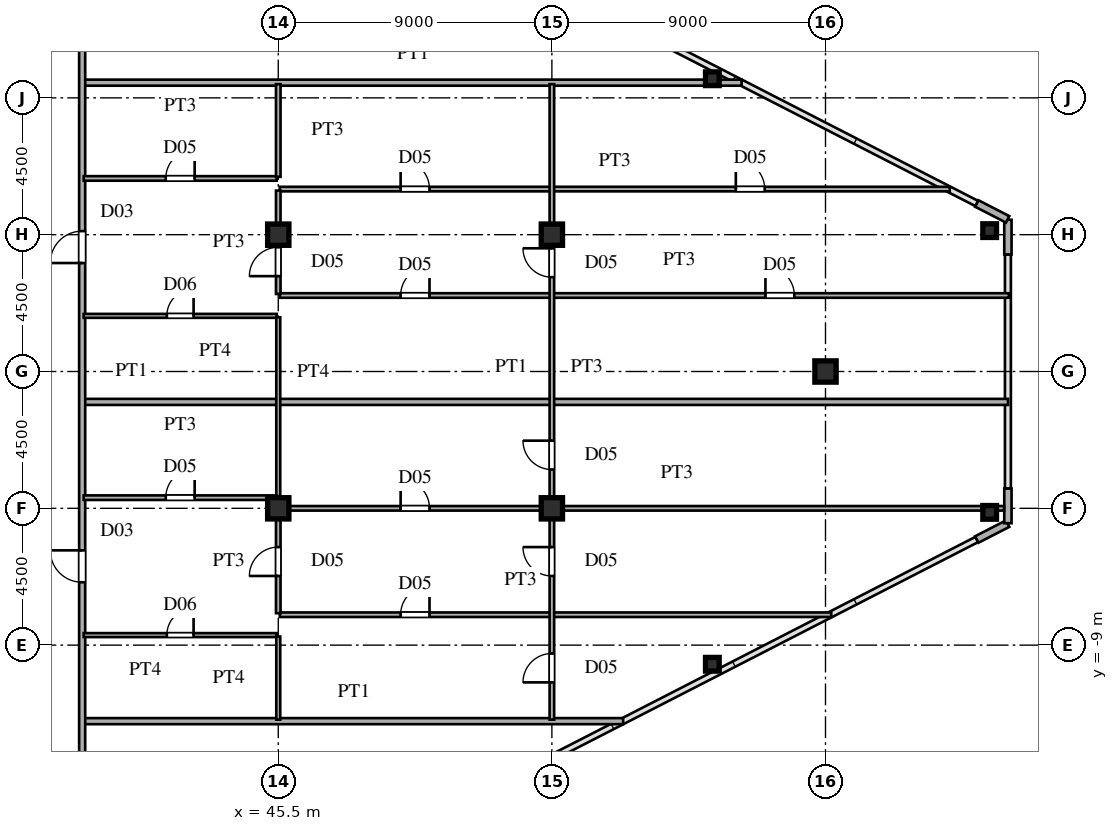
"""IFC4 building model, lengths in metres.
Left out: names, types, materials, properties, quantities, classifications, styles, units other than length and angle.
Written with IfcOpenShell. Run it as: python <this file> out.ifc"""

import sys

from ifc_helpers import new_model, si_unit, direction, frame, frame_2d, origin, origin_2d, place, context, subcontext, project, spatial, rectangle, hollow_rectangle, i_section, extrude, source, transform, mapped, element, fill, save


model = new_model("IFC4")
c1 = context("Model", 3, precision=1e-05, world=origin(), true_north=direction((0.0, 1.0)))
c2 = subcontext(c1, "Body", "Model", "MODEL_VIEW")
j1 = project(units=[si_unit("LENGTHUNIT", "METRE"), si_unit("PLANEANGLEUNIT", "RADIAN")], contexts=[c1])
p1 = place(None, origin())
s1 = spatial("IfcSite", under=j1, at=p1, CompositionType="ELEMENT")
p2 = place(p1, origin())
s2 = spatial("IfcBuilding", under=s1, at=p2, CompositionType="ELEMENT")
p3 = place(p2, frame((0.0, 0.0, 144.0)))
s3 = spatial("IfcBuildingStorey", under=s2, at=p3, CompositionType="ELEMENT", Elevation=144.0)
m1 = source(origin(), c2, "Body", "SweptSolid", [
    extrude(i_section(OverallWidth=0.7, OverallDepth=0.7, WebThickness=0.028, FlangeThickness=0.045, at=origin_2d()), origin(), (0.0, 0.0, 1.0), 3.6),
])
for number, where, z_axis, x_axis in (
    (1, (45.5, -4.5, 0.0), (0.0, 0.0, 1.0), (1.0, 0.0, 0.0)),
    (2, (45.5, 4.5, 0.0), (0.0, 0.0, 1.0), (1.0, 0.0, 0.0)),
    (3, (54.5, -4.5, 0.0), (0.0, 0.0, 1.0), (1.0, 0.0, 0.0)),
    (4, (54.5, 4.5, 0.0), (0.0, 0.0, 1.0), (1.0, 0.0, 0.0)),
    (5, (63.5, 0.0, 0.0), (0.0, 0.0, 1.0), (1.0, 0.0, 0.0)),
):
    element("IfcColumn", number, at=place(p3, frame(where, z_axis=z_axis, x_axis=x_axis)), inside=s3, PredefinedType="COLUMN", context=c2, shape_type="MappedRepresentation", body=[
        mapped(m1, transform((0.0, 0.0, 0.0), scale=1.0)),
    ])
m2 = source(origin(), c2, "Body", "SweptSolid", [
    extrude(hollow_rectangle(XDim=0.45, YDim=0.45, WallThickness=0.018, at=origin_2d()), origin(), (0.0, 0.0, 1.0), 3.6),
])
for number, where, z_axis, x_axis in (
    (6, (68.9, -4.634, 0.0), (0.0, 0.0, 1.0), (1.0, 0.0, 0.0)),
    (7, (68.9, 4.634, 0.0), (0.0, 0.0, 1.0), (1.0, 0.0, 0.0)),
    (8, (59.779, -9.629, 0.0), (0.0, 0.0, 1.0), (1.0, 0.0, 0.0)),
    (9, (59.779, 9.629, 0.0), (0.0, 0.0, 1.0), (1.0, 0.0, 0.0)),
):
    element("IfcColumn", number, at=place(p3, frame(where, z_axis=z_axis, x_axis=x_axis)), inside=s3, PredefinedType="COLUMN", context=c2, shape_type="MappedRepresentation", body=[
        mapped(m2, transform((0.0, 0.0, 0.0), scale=1.0)),
    ])
p4 = place(p3, frame((68.477, -5.525, 0.0), z_axis=(0.0, 0.0, 1.0), x_axis=(0.889797395748, 0.456355776255, 0.0)))
e10 = element("IfcWall", 10, at=p4, inside=s3, PredefinedType="SOLIDWALL", context=c2, shape_type="SweptSolid", body=[
    extrude(rectangle(XDim=1.14, YDim=0.24, at=frame_2d((0.57, 0.0))), origin(), (0.0, 0.0, 1.0), 3.38),
])
for number, where, z_axis, x_axis in (
    (11, (69.5, -4.99, 0.0), (0.0, 0.0, 1.0), (0.0, 1.0, 0.0)),
    (12, (69.5, 3.85, 0.0), (0.0, 0.0, 1.0), (0.0, 1.0, 0.0)),
):
    element("IfcWall", number, at=place(p3, frame(where, z_axis=z_axis, x_axis=x_axis)), inside=s3, PredefinedType="SOLIDWALL", context=c2, shape_type="SweptSolid", body=[
        extrude(rectangle(XDim=1.14, YDim=0.24, at=frame_2d((0.57, 0.0))), origin(), (0.0, 0.0, 1.0), 3.38),
    ])
p5 = place(p3, frame((69.491, 5.005, 0.0), z_axis=(0.0, 0.0, 1.0), x_axis=(-0.889797395748, 0.456355776255, 0.0)))
e13 = element("IfcWall", 13, at=p5, inside=s3, PredefinedType="SOLIDWALL", context=c2, shape_type="SweptSolid", body=[
    extrude(rectangle(XDim=1.14, YDim=0.24, at=frame_2d((0.57, 0.0))), origin(), (0.0, 0.0, 1.0), 3.38),
])
p6 = place(p3, frame((39.13, -11.5, 0.0), z_axis=(0.0, 0.0, 1.0), x_axis=(1.0, 0.0, 0.0)))
e14 = element("IfcWall", 14, at=p6, inside=s3, PredefinedType="PARTITIONING", context=c2, shape_type="SweptSolid", body=[
    extrude(rectangle(XDim=17.714, YDim=0.2, at=frame_2d((8.857, 0.0))), origin(), (0.0, 0.0, 1.0), 3.38),
])
p7 = place(p3, frame((39.1, -8.67, 0.0), z_axis=(0.0, 0.0, 1.0), x_axis=(1.0, 0.0, 0.0)))
e15 = element("IfcWall", 15, at=p7, inside=s3, PredefinedType="PARTITIONING", context=c2, shape_type="SweptSolid", body=[
    extrude(rectangle(XDim=6.35, YDim=0.13, at=frame_2d((3.175, 0.0))), origin(), (0.0, 0.0, 1.0), 3.38),
])
p8 = place(p7, frame((2.735, 0.0, 0.0)))
e16 = element("IfcOpeningElement", 16, at=p8, cuts=e15, PredefinedType="OPENING", context=c2, shape_type="SweptSolid", body=[
    extrude(rectangle(XDim=0.88, YDim=2.1, at=frame_2d((0.44, 1.05))), frame((0.0, 0.075, 0.0), z_axis=(0.0, -1.0, 0.0), x_axis=(1.0, 0.0, 0.0)), (0.0, 0.0, 1.0), 0.15),
])
p9 = place(p3, frame((45.55, -8.0, 0.0), z_axis=(0.0, 0.0, 1.0), x_axis=(1.0, 0.0, 0.0)))
e17 = element("IfcWall", 17, at=p9, inside=s3, PredefinedType="PARTITIONING", context=c2, shape_type="SweptSolid", body=[
    extrude(rectangle(XDim=18.139, YDim=0.15, at=frame_2d((9.069, 0.0))), origin(), (0.0, 0.0, 1.0), 3.38),
])
p10 = place(p9, frame((3.975, 0.0, 0.0)))
e18 = element("IfcOpeningElement", 18, at=p10, cuts=e17, PredefinedType="OPENING", context=c2, shape_type="SweptSolid", body=[
    extrude(rectangle(XDim=0.95, YDim=2.15, at=frame_2d((0.475, 1.075))), frame((0.0, 0.085, 0.0), z_axis=(0.0, -1.0, 0.0), x_axis=(1.0, 0.0, 0.0)), (0.0, 0.0, 1.0), 0.17),
])
p11 = place(p3, frame((45.55, -4.5, 0.0), z_axis=(0.0, 0.0, 1.0), x_axis=(1.0, 0.0, 0.0)))
e19 = element("IfcWall", 19, at=p11, inside=s3, PredefinedType="PARTITIONING", context=c2, shape_type="SweptSolid", body=[
    extrude(rectangle(XDim=23.825, YDim=0.15, at=frame_2d((11.913, 0.0))), origin(), (0.0, 0.0, 1.0), 2.78),
])
p12 = place(p11, frame((3.975, 0.0, 0.0)))
e20 = element("IfcOpeningElement", 20, at=p12, cuts=e19, PredefinedType="OPENING", context=c2, shape_type="SweptSolid", body=[
    extrude(rectangle(XDim=0.95, YDim=2.15, at=frame_2d((0.475, 1.075))), frame((0.0, 0.085, 0.0), z_axis=(0.0, -1.0, 0.0), x_axis=(1.0, 0.0, 0.0)), (0.0, 0.0, 1.0), 0.17),
])
p13 = place(p3, frame((39.1, -4.15, 0.0), z_axis=(0.0, 0.0, 1.0), x_axis=(1.0, 0.0, 0.0)))
e21 = element("IfcWall", 21, at=p13, inside=s3, PredefinedType="PARTITIONING", context=c2, shape_type="SweptSolid", body=[
    extrude(rectangle(XDim=6.35, YDim=0.15, at=frame_2d((3.175, 0.0))), origin(), (0.0, 0.0, 1.0), 3.38),
])
p14 = place(p13, frame((2.7, 0.0, 0.0)))
e22 = element("IfcOpeningElement", 22, at=p14, cuts=e21, PredefinedType="OPENING", context=c2, shape_type="SweptSolid", body=[
    extrude(rectangle(XDim=0.95, YDim=2.15, at=frame_2d((0.475, 1.075))), frame((0.0, 0.085, 0.0), z_axis=(0.0, -1.0, 0.0), x_axis=(1.0, 0.0, 0.0)), (0.0, 0.0, 1.0), 0.17),
])
p15 = place(p3, frame((39.13, -1.0, 0.0), z_axis=(0.0, 0.0, 1.0), x_axis=(1.0, 0.0, 0.0)))
e23 = element("IfcWall", 23, at=p15, inside=s3, PredefinedType="PARTITIONING", context=c2, shape_type="SweptSolid", body=[
    extrude(rectangle(XDim=30.375, YDim=0.2, at=frame_2d((15.188, 0.0))), origin(), (0.0, 0.0, 1.0), 3.38),
])
p16 = place(p3, frame((39.1, 1.83, 0.0), z_axis=(0.0, 0.0, 1.0), x_axis=(1.0, 0.0, 0.0)))
e24 = element("IfcWall", 24, at=p16, inside=s3, PredefinedType="PARTITIONING", context=c2, shape_type="SweptSolid", body=[
    extrude(rectangle(XDim=6.35, YDim=0.13, at=frame_2d((3.175, 0.0))), origin(), (0.0, 0.0, 1.0), 3.38),
])
p17 = place(p16, frame((2.735, 0.0, 0.0)))
e25 = element("IfcOpeningElement", 25, at=p17, cuts=e24, PredefinedType="OPENING", context=c2, shape_type="SweptSolid", body=[
    extrude(rectangle(XDim=0.88, YDim=2.1, at=frame_2d((0.44, 1.05))), frame((0.0, 0.075, 0.0), z_axis=(0.0, -1.0, 0.0), x_axis=(1.0, 0.0, 0.0)), (0.0, 0.0, 1.0), 0.15),
])
p18 = place(p3, frame((45.55, 2.5, 0.0), z_axis=(0.0, 0.0, 1.0), x_axis=(1.0, 0.0, 0.0)))
e26 = element("IfcWall", 26, at=p18, inside=s3, PredefinedType="PARTITIONING", context=c2, shape_type="SweptSolid", body=[
    extrude(rectangle(XDim=23.985, YDim=0.15, at=frame_2d((11.992, 0.0))), origin(), (0.0, 0.0, 1.0), 3.38),
])
p19 = place(p18, frame((3.975, 0.0, 0.0)))
e27 = element("IfcOpeningElement", 27, at=p19, cuts=e26, PredefinedType="OPENING", context=c2, shape_type="SweptSolid", body=[
    extrude(rectangle(XDim=0.95, YDim=2.15, at=frame_2d((0.475, 1.075))), frame((0.0, 0.085, 0.0), z_axis=(0.0, -1.0, 0.0), x_axis=(1.0, 0.0, 0.0)), (0.0, 0.0, 1.0), 0.17),
])
p20 = place(p18, frame((15.975, 0.0, 0.0)))
e28 = element("IfcOpeningElement", 28, at=p20, cuts=e26, PredefinedType="OPENING", context=c2, shape_type="SweptSolid", body=[
    extrude(rectangle(XDim=0.95, YDim=2.15, at=frame_2d((0.475, 1.075))), frame((0.0, 0.085, 0.0), z_axis=(0.0, -1.0, 0.0), x_axis=(1.0, 0.0, 0.0)), (0.0, 0.0, 1.0), 0.17),
])
p21 = place(p3, frame((45.55, 6.0, 0.0), z_axis=(0.0, 0.0, 1.0), x_axis=(1.0, 0.0, 0.0)))
e29 = element("IfcWall", 29, at=p21, inside=s3, PredefinedType="PARTITIONING", context=c2, shape_type="SweptSolid", body=[
    extrude(rectangle(XDim=22.036, YDim=0.15, at=frame_2d((11.018, 0.0))), origin(), (0.0, 0.0, 1.0), 3.38),
])
p22 = place(p21, frame((3.975, 0.0, 0.0)))
e30 = element("IfcOpeningElement", 30, at=p22, cuts=e29, PredefinedType="OPENING", context=c2, shape_type="SweptSolid", body=[
    extrude(rectangle(XDim=0.95, YDim=2.15, at=frame_2d((0.475, 1.075))), frame((0.0, 0.085, 0.0), z_axis=(0.0, -1.0, 0.0), x_axis=(1.0, 0.0, 0.0)), (0.0, 0.0, 1.0), 0.17),
])
p23 = place(p21, frame((15.001, 0.0, 0.0)))
e31 = element("IfcOpeningElement", 31, at=p23, cuts=e29, PredefinedType="OPENING", context=c2, shape_type="SweptSolid", body=[
    extrude(rectangle(XDim=0.95, YDim=2.15, at=frame_2d((0.475, 1.075))), frame((0.0, 0.085, 0.0), z_axis=(0.0, -1.0, 0.0), x_axis=(1.0, 0.0, 0.0)), (0.0, 0.0, 1.0), 0.17),
])
p24 = place(p3, frame((39.1, 6.35, 0.0), z_axis=(0.0, 0.0, 1.0), x_axis=(1.0, 0.0, 0.0)))
e32 = element("IfcWall", 32, at=p24, inside=s3, PredefinedType="PARTITIONING", context=c2, shape_type="SweptSolid", body=[
    extrude(rectangle(XDim=6.35, YDim=0.15, at=frame_2d((3.175, 0.0))), origin(), (0.0, 0.0, 1.0), 3.38),
])
p25 = place(p24, frame((2.7, 0.0, 0.0)))
e33 = element("IfcOpeningElement", 33, at=p25, cuts=e32, PredefinedType="OPENING", context=c2, shape_type="SweptSolid", body=[
    extrude(rectangle(XDim=0.95, YDim=2.15, at=frame_2d((0.475, 1.075))), frame((0.0, 0.085, 0.0), z_axis=(0.0, -1.0, 0.0), x_axis=(1.0, 0.0, 0.0)), (0.0, 0.0, 1.0), 0.17),
])
p26 = place(p3, frame((39.13, 9.5, 0.0), z_axis=(0.0, 0.0, 1.0), x_axis=(1.0, 0.0, 0.0)))
e34 = element("IfcWall", 34, at=p26, inside=s3, PredefinedType="PARTITIONING", context=c2, shape_type="SweptSolid", body=[
    extrude(rectangle(XDim=21.612, YDim=0.2, at=frame_2d((10.806, 0.0))), origin(), (0.0, 0.0, 1.0), 3.38),
])
p27 = place(p3, frame((39.05, -15.715, 0.0), z_axis=(0.0, 0.0, 1.0), x_axis=(0.0, 1.0, 0.0)))
e35 = element("IfcWall", 35, at=p27, inside=s3, PredefinedType="PARTITIONING", context=c2, shape_type="SweptSolid", body=[
    extrude(rectangle(XDim=31.43, YDim=0.2, at=frame_2d((15.715, 0.0))), origin(), (0.0, 0.0, 1.0), 3.38),
])
p28 = place(p27, frame((1.54, 0.0, 0.0)))
e36 = element("IfcOpeningElement", 36, at=p28, cuts=e35, PredefinedType="OPENING", context=c2, shape_type="SweptSolid", body=[
    extrude(rectangle(XDim=1.05, YDim=2.25, at=frame_2d((0.525, 1.125))), frame((0.0, 0.11, 0.0), z_axis=(0.0, -1.0, 0.0), x_axis=(1.0, 0.0, 0.0)), (0.0, 0.0, 1.0), 0.22),
])
p29 = place(p27, frame((8.782, 0.0, 0.0)))
e37 = element("IfcOpeningElement", 37, at=p29, cuts=e35, PredefinedType="OPENING", context=c2, shape_type="SweptSolid", body=[
    extrude(rectangle(XDim=1.05, YDim=2.25, at=frame_2d((0.525, 1.125))), frame((0.0, 0.11, 0.0), z_axis=(0.0, -1.0, 0.0), x_axis=(1.0, 0.0, 0.0)), (0.0, 0.0, 1.0), 0.22),
])
p30 = place(p27, frame((19.282, 0.0, 0.0)))
e38 = element("IfcOpeningElement", 38, at=p30, cuts=e35, PredefinedType="OPENING", context=c2, shape_type="SweptSolid", body=[
    extrude(rectangle(XDim=1.05, YDim=2.25, at=frame_2d((0.525, 1.125))), frame((0.0, 0.11, 0.0), z_axis=(0.0, -1.0, 0.0), x_axis=(1.0, 0.0, 0.0)), (0.0, 0.0, 1.0), 0.22),
])
p31 = place(p27, frame((27.84, 0.0, 0.0)))
e39 = element("IfcOpeningElement", 39, at=p31, cuts=e35, PredefinedType="OPENING", context=c2, shape_type="SweptSolid", body=[
    extrude(rectangle(XDim=1.05, YDim=2.25, at=frame_2d((0.525, 1.125))), frame((0.0, 0.11, 0.0), z_axis=(0.0, -1.0, 0.0), x_axis=(1.0, 0.0, 0.0)), (0.0, 0.0, 1.0), 0.22),
])
p32 = place(p3, frame((45.5, -11.45, 0.0), z_axis=(0.0, 0.0, 1.0), x_axis=(0.0, 1.0, 0.0)))
e40 = element("IfcWall", 40, at=p32, inside=s3, PredefinedType="PARTITIONING", context=c2, shape_type="SweptSolid", body=[
    extrude(rectangle(XDim=2.733, YDim=0.13, at=frame_2d((1.366, 0.0))), origin(), (0.0, 0.0, 1.0), 2.78),
])
p33 = place(p3, frame((45.5, -7.95, 0.0), z_axis=(0.0, 0.0, 1.0), x_axis=(0.0, 1.0, 0.0)))
e41 = element("IfcWall", 41, at=p33, inside=s3, PredefinedType="PARTITIONING", context=c2, shape_type="SweptSolid", body=[
    extrude(rectangle(XDim=3.4, YDim=0.15, at=frame_2d((1.7, 0.0))), origin(), (0.0, 0.0, 1.0), 2.78),
])
p34 = place(p33, frame((1.225, 0.0, 0.0)))
e42 = element("IfcOpeningElement", 42, at=p34, cuts=e41, PredefinedType="OPENING", context=c2, shape_type="SweptSolid", body=[
    extrude(rectangle(XDim=0.95, YDim=2.15, at=frame_2d((0.475, 1.075))), frame((0.0, 0.085, 0.0), z_axis=(0.0, -1.0, 0.0), x_axis=(1.0, 0.0, 0.0)), (0.0, 0.0, 1.0), 0.17),
])
p35 = place(p3, frame((45.5, -4.098, 0.0), z_axis=(0.0, 0.0, 1.0), x_axis=(0.0, 1.0, 0.0)))
e43 = element("IfcWall", 43, at=p35, inside=s3, PredefinedType="PARTITIONING", context=c2, shape_type="SweptSolid", body=[
    extrude(rectangle(XDim=5.881, YDim=0.13, at=frame_2d((2.94, 0.0))), origin(), (0.0, 0.0, 1.0), 2.78),
])
p36 = place(p3, frame((45.5, 2.55, 0.0), z_axis=(0.0, 0.0, 1.0), x_axis=(0.0, 1.0, 0.0)))
e44 = element("IfcWall", 44, at=p36, inside=s3, PredefinedType="PARTITIONING", context=c2, shape_type="SweptSolid", body=[
    extrude(rectangle(XDim=3.4, YDim=0.15, at=frame_2d((1.7, 0.0))), origin(), (0.0, 0.0, 1.0), 2.78),
])
p37 = place(p36, frame((0.586, 0.0, 0.0)))
e45 = element("IfcOpeningElement", 45, at=p37, cuts=e44, PredefinedType="OPENING", context=c2, shape_type="SweptSolid", body=[
    extrude(rectangle(XDim=0.95, YDim=2.15, at=frame_2d((0.475, 1.075))), frame((0.0, 0.085, 0.0), z_axis=(0.0, -1.0, 0.0), x_axis=(1.0, 0.0, 0.0)), (0.0, 0.0, 1.0), 0.17),
])
p38 = place(p3, frame((45.5, 6.402, 0.0), z_axis=(0.0, 0.0, 1.0), x_axis=(0.0, 1.0, 0.0)))
e46 = element("IfcWall", 46, at=p38, inside=s3, PredefinedType="PARTITIONING", context=c2, shape_type="SweptSolid", body=[
    extrude(rectangle(XDim=3.048, YDim=0.15, at=frame_2d((1.524, 0.0))), origin(), (0.0, 0.0, 1.0), 2.78),
])
p39 = place(p3, frame((54.5, -11.45, 0.0), z_axis=(0.0, 0.0, 1.0), x_axis=(0.0, 1.0, 0.0)))
e47 = element("IfcWall", 47, at=p39, inside=s3, PredefinedType="PARTITIONING", context=c2, shape_type="SweptSolid", body=[
    extrude(rectangle(XDim=20.9, YDim=0.15, at=frame_2d((10.45, 0.0))), origin(), (0.0, 0.0, 1.0), 2.78),
])
p40 = place(p39, frame((4.725, 0.0, 0.0)))
e48 = element("IfcOpeningElement", 48, at=p40, cuts=e47, PredefinedType="OPENING", context=c2, shape_type="SweptSolid", body=[
    extrude(rectangle(XDim=0.95, YDim=2.15, at=frame_2d((0.475, 1.075))), frame((0.0, 0.085, 0.0), z_axis=(0.0, -1.0, 0.0), x_axis=(1.0, 0.0, 0.0)), (0.0, 0.0, 1.0), 0.17),
])
p41 = place(p39, frame((1.225, 0.0, 0.0)))
e49 = element("IfcOpeningElement", 49, at=p41, cuts=e47, PredefinedType="OPENING", context=c2, shape_type="SweptSolid", body=[
    extrude(rectangle(XDim=0.95, YDim=2.15, at=frame_2d((0.475, 1.075))), frame((0.0, 0.085, 0.0), z_axis=(0.0, -1.0, 0.0), x_axis=(1.0, 0.0, 0.0)), (0.0, 0.0, 1.0), 0.17),
])
p42 = place(p39, frame((8.225, 0.0, 0.0)))
e50 = element("IfcOpeningElement", 50, at=p42, cuts=e47, PredefinedType="OPENING", context=c2, shape_type="SweptSolid", body=[
    extrude(rectangle(XDim=0.95, YDim=2.15, at=frame_2d((0.475, 1.075))), frame((0.0, 0.085, 0.0), z_axis=(0.0, -1.0, 0.0), x_axis=(1.0, 0.0, 0.0)), (0.0, 0.0, 1.0), 0.17),
])
p43 = place(p39, frame((14.552, 0.0, 0.0)))
e51 = element("IfcOpeningElement", 51, at=p43, cuts=e47, PredefinedType="OPENING", context=c2, shape_type="SweptSolid", body=[
    extrude(rectangle(XDim=0.95, YDim=2.15, at=frame_2d((0.475, 1.075))), frame((0.0, 0.085, 0.0), z_axis=(0.0, -1.0, 0.0), x_axis=(1.0, 0.0, 0.0)), (0.0, 0.0, 1.0), 0.17),
])
m3 = source(origin(), c2, "Body", "SweptSolid", [
    extrude(rectangle(XDim=0.88, YDim=2.1, at=frame_2d((0.44, 1.05))), frame((0.0, 0.025, 0.0), z_axis=(0.0, -1.0, 0.0), x_axis=(1.0, 0.0, 0.0)), (0.0, 0.0, 1.0), 0.05),
])
p44 = place(p8, origin())
e52 = element("IfcDoor", 52, at=p44, inside=s3, OperationType="SINGLE_SWING_RIGHT", PredefinedType="DOOR", context=c2, shape_type="MappedRepresentation", body=[
    mapped(m3, transform((0.0, 0.0, 0.0), scale=1.0)),
])
fill(e16, e52)
m4 = source(origin(), c2, "Body", "SweptSolid", [
    extrude(rectangle(XDim=0.95, YDim=2.15, at=frame_2d((0.475, 1.075))), frame((0.0, 0.025, 0.0), z_axis=(0.0, -1.0, 0.0), x_axis=(1.0, 0.0, 0.0)), (0.0, 0.0, 1.0), 0.05),
])
p45 = place(p10, origin())
e53 = element("IfcDoor", 53, at=p45, inside=s3, OperationType="SINGLE_SWING_RIGHT", PredefinedType="DOOR", context=c2, shape_type="MappedRepresentation", body=[
    mapped(m4, transform((0.0, 0.0, 0.0), scale=1.0)),
])
fill(e18, e53)
p46 = place(p12, origin())
e54 = element("IfcDoor", 54, at=p46, inside=s3, OperationType="SINGLE_SWING_LEFT", PredefinedType="DOOR", context=c2, shape_type="MappedRepresentation", body=[
    mapped(m4, transform((0.0, 0.0, 0.0), scale=1.0)),
])
fill(e20, e54)
p47 = place(p14, origin())
e55 = element("IfcDoor", 55, at=p47, inside=s3, OperationType="SINGLE_SWING_RIGHT", PredefinedType="DOOR", context=c2, shape_type="MappedRepresentation", body=[
    mapped(m4, transform((0.0, 0.0, 0.0), scale=1.0)),
])
fill(e22, e55)
p48 = place(p17, origin())
e56 = element("IfcDoor", 56, at=p48, inside=s3, OperationType="SINGLE_SWING_RIGHT", PredefinedType="DOOR", context=c2, shape_type="MappedRepresentation", body=[
    mapped(m3, transform((0.0, 0.0, 0.0), scale=1.0)),
])
fill(e25, e56)
p49 = place(p19, origin())
e57 = element("IfcDoor", 57, at=p49, inside=s3, OperationType="SINGLE_SWING_RIGHT", PredefinedType="DOOR", context=c2, shape_type="MappedRepresentation", body=[
    mapped(m4, transform((0.0, 0.0, 0.0), scale=1.0)),
])
fill(e27, e57)
p50 = place(p20, origin())
e58 = element("IfcDoor", 58, at=p50, inside=s3, OperationType="SINGLE_SWING_LEFT", PredefinedType="DOOR", context=c2, shape_type="MappedRepresentation", body=[
    mapped(m4, transform((0.0, 0.0, 0.0), scale=1.0)),
])
fill(e28, e58)
p51 = place(p22, origin())
e59 = element("IfcDoor", 59, at=p51, inside=s3, OperationType="SINGLE_SWING_LEFT", PredefinedType="DOOR", context=c2, shape_type="MappedRepresentation", body=[
    mapped(m4, transform((0.0, 0.0, 0.0), scale=1.0)),
])
fill(e30, e59)
p52 = place(p23, origin())
e60 = element("IfcDoor", 60, at=p52, inside=s3, OperationType="SINGLE_SWING_LEFT", PredefinedType="DOOR", context=c2, shape_type="MappedRepresentation", body=[
    mapped(m4, transform((0.0, 0.0, 0.0), scale=1.0)),
])
fill(e31, e60)
p53 = place(p25, origin())
e61 = element("IfcDoor", 61, at=p53, inside=s3, OperationType="SINGLE_SWING_RIGHT", PredefinedType="DOOR", context=c2, shape_type="MappedRepresentation", body=[
    mapped(m4, transform((0.0, 0.0, 0.0), scale=1.0)),
])
fill(e33, e61)
m5 = source(origin(), c2, "Body", "SweptSolid", [
    extrude(rectangle(XDim=1.05, YDim=2.25, at=frame_2d((0.525, 1.125))), frame((0.0, 0.025, 0.0), z_axis=(0.0, -1.0, 0.0), x_axis=(1.0, 0.0, 0.0)), (0.0, 0.0, 1.0), 0.05),
])
p54 = place(p29, origin())
e62 = element("IfcDoor", 62, at=p54, inside=s3, OperationType="SINGLE_SWING_RIGHT", PredefinedType="DOOR", context=c2, shape_type="MappedRepresentation", body=[
    mapped(m5, transform((0.0, 0.0, 0.0), scale=1.0)),
])
fill(e37, e62)
p55 = place(p30, origin())
e63 = element("IfcDoor", 63, at=p55, inside=s3, OperationType="SINGLE_SWING_LEFT", PredefinedType="DOOR", context=c2, shape_type="MappedRepresentation", body=[
    mapped(m5, transform((0.0, 0.0, 0.0), scale=1.0)),
])
fill(e38, e63)
p56 = place(p34, origin())
e64 = element("IfcDoor", 64, at=p56, inside=s3, OperationType="SINGLE_SWING_LEFT", PredefinedType="DOOR", context=c2, shape_type="MappedRepresentation", body=[
    mapped(m4, transform((0.0, 0.0, 0.0), scale=1.0)),
])
fill(e42, e64)
p57 = place(p37, origin())
e65 = element("IfcDoor", 65, at=p57, inside=s3, OperationType="SINGLE_SWING_LEFT", PredefinedType="DOOR", context=c2, shape_type="MappedRepresentation", body=[
    mapped(m4, transform((0.0, 0.0, 0.0), scale=1.0)),
])
fill(e45, e65)
p58 = place(p40, origin())
e66 = element("IfcDoor", 66, at=p58, inside=s3, OperationType="SINGLE_SWING_RIGHT", PredefinedType="DOOR", context=c2, shape_type="MappedRepresentation", body=[
    mapped(m4, transform((0.0, 0.0, 0.0), scale=1.0)),
])
fill(e48, e66)
p59 = place(p41, origin())
e67 = element("IfcDoor", 67, at=p59, inside=s3, OperationType="SINGLE_SWING_LEFT", PredefinedType="DOOR", context=c2, shape_type="MappedRepresentation", body=[
    mapped(m4, transform((0.0, 0.0, 0.0), scale=1.0)),
])
fill(e49, e67)
p60 = place(p42, origin())
e68 = element("IfcDoor", 68, at=p60, inside=s3, OperationType="SINGLE_SWING_RIGHT", PredefinedType="DOOR", context=c2, shape_type="MappedRepresentation", body=[
    mapped(m4, transform((0.0, 0.0, 0.0), scale=1.0)),
])
fill(e50, e68)
p61 = place(p43, origin())
e69 = element("IfcDoor", 69, at=p61, inside=s3, OperationType="SINGLE_SWING_RIGHT", PredefinedType="DOOR", context=c2, shape_type="MappedRepresentation", body=[
    mapped(m4, transform((0.0, 0.0, 0.0), scale=1.0)),
])
fill(e51, e69)
save(model, sys.argv[1])
